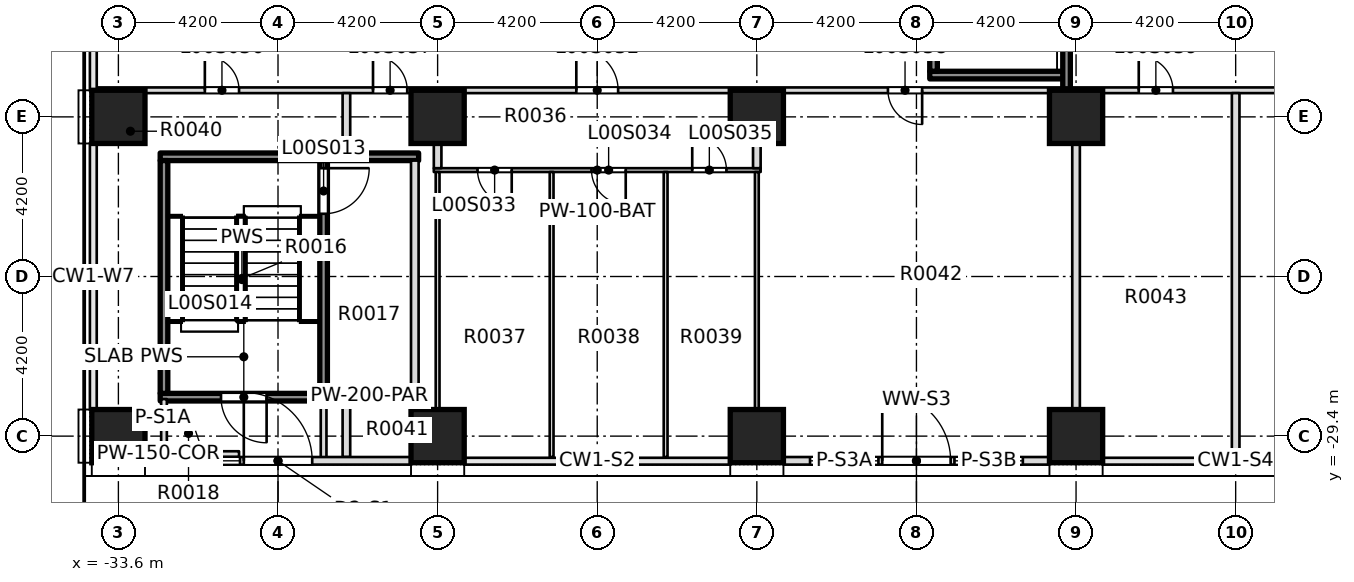
"""IFC4 building model, lengths in metres.
Left out: names, types, materials, properties, quantities, classifications, styles, units other than length and angle.
Written with IfcOpenShell. Run it as: python <this file> out.ifc"""

import sys

from ifc_helpers import new_model, si_unit, direction, frame, frame_2d, origin, origin_2d, place, context, subcontext, project, spatial, rectangle, extrude, element, fill, save


model = new_model("IFC4")
c1 = context("Model", 3, precision=1e-05, world=origin(), true_north=direction((0.0, 1.0)))
c2 = subcontext(c1, "Body", "Model", "MODEL_VIEW")
j1 = project(units=[si_unit("LENGTHUNIT", "METRE"), si_unit("PLANEANGLEUNIT", "RADIAN")], contexts=[c1])
p1 = place(None, origin())
s1 = spatial("IfcSite", under=j1, at=p1, CompositionType="ELEMENT")
p2 = place(p1, origin())
s2 = spatial("IfcBuilding", under=s1, at=p2, CompositionType="ELEMENT")
p3 = place(p2, origin())
s3 = spatial("IfcBuildingStorey", under=s2, at=p3, CompositionType="ELEMENT", Elevation=0.0)
for number, where, z_axis, x_axis in (
    (1, (-16.8, -21.0, -0.45), (0.0, 0.0, 1.0), (1.0, 0.0, 0.0)),
    (2, (-8.4, -21.0, -0.45), (0.0, 0.0, 1.0), (1.0, 0.0, 0.0)),
):
    element("IfcColumn", number, at=place(p3, frame(where, z_axis=z_axis, x_axis=x_axis)), inside=s3, PredefinedType="COLUMN", context=c2, shape_type="SweptSolid", body=[
        extrude(rectangle(XDim=1.4, YDim=1.4, at=origin_2d()), origin(), (0.0, 0.0, 1.0), 7.55),
    ])
for number, where, z_axis, x_axis in (
    (3, (-33.6, -29.4, 0.0), (0.0, 0.0, 1.0), (1.0, 0.0, 0.0)),
    (4, (-25.2, -29.4, 0.0), (0.0, 0.0, 1.0), (1.0, 0.0, 0.0)),
    (5, (-16.8, -29.4, 0.0), (0.0, 0.0, 1.0), (1.0, 0.0, 0.0)),
    (6, (-8.4, -29.4, 0.0), (0.0, 0.0, 1.0), (1.0, 0.0, 0.0)),
    (7, (-33.6, -21.0, 0.0), (0.0, 0.0, 1.0), (1.0, 0.0, 0.0)),
    (8, (-25.2, -21.0, 0.0), (0.0, 0.0, 1.0), (1.0, 0.0, 0.0)),
):
    element("IfcColumn", number, at=place(p3, frame(where, z_axis=z_axis, x_axis=x_axis)), inside=s3, PredefinedType="COLUMN", context=c2, shape_type="SweptSolid", body=[
        extrude(rectangle(XDim=1.4, YDim=1.4, at=origin_2d()), origin(), (0.0, 0.0, 1.0), 7.5),
    ])
p4 = place(p3, frame((-32.475, -29.873, 0.0), z_axis=(0.0, 0.0, 1.0), x_axis=(1.0, 0.0, 0.0)))
e9 = element("IfcWall", 9, at=p4, inside=s3, PredefinedType="PARTITIONING", context=c2, shape_type="SweptSolid", body=[
    extrude(rectangle(XDim=2.05, YDim=0.15, at=frame_2d((1.025, 0.0))), origin(), (0.0, 0.0, 1.0), 7.1),
])
p5 = place(p3, frame((-32.5, -28.375, 0.0), z_axis=(0.0, 0.0, 1.0), x_axis=(1.0, 0.0, 0.0)))
e10 = element("IfcWall", 10, at=p5, inside=s3, PredefinedType="SOLIDWALL", context=c2, shape_type="SweptSolid", body=[
    extrude(rectangle(XDim=4.4, YDim=0.2, at=frame_2d((2.2, 0.0))), origin(), (0.0, 0.0, 1.0), 7.1),
])
p6 = place(p5, frame((1.6, 0.0, 0.0)))
e11 = element("IfcOpeningElement", 11, at=p6, cuts=e10, PredefinedType="OPENING", context=c2, shape_type="SweptSolid", body=[
    extrude(rectangle(XDim=1.2, YDim=2.1, at=frame_2d((0.6, 1.05))), frame((0.0, 0.11, 0.0), z_axis=(0.0, -1.0, 0.0), x_axis=(1.0, 0.0, 0.0)), (0.0, 0.0, 1.0), 0.22),
])
p7 = place(p3, frame((-28.3, -28.35, 0.0), z_axis=(0.0, 0.0, 1.0), x_axis=(1.0, 0.0, 0.0)))
e12 = element("IfcWall", 12, at=p7, inside=s3, PredefinedType="PARTITIONING", context=c2, shape_type="SweptSolid", body=[
    extrude(rectangle(XDim=2.6, YDim=0.2, at=frame_2d((1.3, 0.0))), origin(), (0.0, 0.0, 1.0), 7.1),
])
p8 = place(p3, frame((-25.3, -22.4, 0.0), z_axis=(0.0, 0.0, 1.0), x_axis=(1.0, 0.0, 0.0)))
e13 = element("IfcWall", 13, at=p8, inside=s3, PredefinedType="PARTITIONING", context=c2, shape_type="SweptSolid", body=[
    extrude(rectangle(XDim=8.6, YDim=0.1, at=frame_2d((4.3, 0.0))), origin(), (0.0, 0.0, 1.0), 7.1),
])
p9 = place(p8, frame((1.15, 0.0, 0.0)))
e14 = element("IfcOpeningElement", 14, at=p9, cuts=e13, PredefinedType="OPENING", context=c2, shape_type="SweptSolid", body=[
    extrude(rectangle(XDim=0.9, YDim=2.1, at=frame_2d((0.45, 1.05))), frame((0.0, 0.06, 0.0), z_axis=(0.0, -1.0, 0.0), x_axis=(1.0, 0.0, 0.0)), (0.0, 0.0, 1.0), 0.12),
])
p10 = place(p8, frame((4.15, 0.0, 0.0)))
e15 = element("IfcOpeningElement", 15, at=p10, cuts=e13, PredefinedType="OPENING", context=c2, shape_type="SweptSolid", body=[
    extrude(rectangle(XDim=0.9, YDim=2.1, at=frame_2d((0.45, 1.05))), frame((0.0, 0.06, 0.0), z_axis=(0.0, -1.0, 0.0), x_axis=(1.0, 0.0, 0.0)), (0.0, 0.0, 1.0), 0.12),
])
p11 = place(p8, frame((6.8, 0.0, 0.0)))
e16 = element("IfcOpeningElement", 16, at=p11, cuts=e13, PredefinedType="OPENING", context=c2, shape_type="SweptSolid", body=[
    extrude(rectangle(XDim=0.9, YDim=2.1, at=frame_2d((0.45, 1.05))), frame((0.0, 0.06, 0.0), z_axis=(0.0, -1.0, 0.0), x_axis=(1.0, 0.0, 0.0)), (0.0, 0.0, 1.0), 0.12),
])
p12 = place(p3, frame((-32.5, -22.05, 0.0), z_axis=(0.0, 0.0, 1.0), x_axis=(1.0, 0.0, 0.0)))
e17 = element("IfcWall", 17, at=p12, inside=s3, PredefinedType="SOLIDWALL", context=c2, shape_type="SweptSolid", body=[
    extrude(rectangle(XDim=6.8, YDim=0.2, at=frame_2d((3.4, 0.0))), origin(), (0.0, 0.0, 1.0), 7.1),
])
p13 = place(p3, frame((-34.15, -20.3, 0.0), z_axis=(0.0, 0.0, 1.0), x_axis=(1.0, 0.0, 0.0)))
e18 = element("IfcWall", 18, at=p13, inside=s3, PredefinedType="PARTITIONING", context=c2, shape_type="SweptSolid", body=[
    extrude(rectangle(XDim=67.825, YDim=0.15, at=frame_2d((33.913, 0.0))), origin(), (0.0, 0.0, 1.0), 7.1),
])
p14 = place(p13, frame((12.6, 0.0, 0.0)))
e19 = element("IfcOpeningElement", 19, at=p14, cuts=e18, PredefinedType="OPENING", context=c2, shape_type="SweptSolid", body=[
    extrude(rectangle(XDim=1.1, YDim=2.1, at=frame_2d((0.55, 1.05))), frame((0.0, 0.085, 0.0), z_axis=(0.0, -1.0, 0.0), x_axis=(1.0, 0.0, 0.0)), (0.0, 0.0, 1.0), 0.17),
])
p15 = place(p13, frame((2.825, 0.0, 0.0)))
e20 = element("IfcOpeningElement", 20, at=p15, cuts=e18, PredefinedType="OPENING", context=c2, shape_type="SweptSolid", body=[
    extrude(rectangle(XDim=0.9, YDim=2.1, at=frame_2d((0.45, 1.05))), frame((0.0, 0.085, 0.0), z_axis=(0.0, -1.0, 0.0), x_axis=(1.0, 0.0, 0.0)), (0.0, 0.0, 1.0), 0.17),
])
p16 = place(p13, frame((7.25, 0.0, 0.0)))
e21 = element("IfcOpeningElement", 21, at=p16, cuts=e18, PredefinedType="OPENING", context=c2, shape_type="SweptSolid", body=[
    extrude(rectangle(XDim=0.9, YDim=2.1, at=frame_2d((0.45, 1.05))), frame((0.0, 0.085, 0.0), z_axis=(0.0, -1.0, 0.0), x_axis=(1.0, 0.0, 0.0)), (0.0, 0.0, 1.0), 0.17),
])
p17 = place(p13, frame((20.8, 0.0, 0.0)))
e22 = element("IfcOpeningElement", 22, at=p17, cuts=e18, PredefinedType="OPENING", context=c2, shape_type="SweptSolid", body=[
    extrude(rectangle(XDim=0.9, YDim=2.1, at=frame_2d((0.45, 1.05))), frame((0.0, 0.085, 0.0), z_axis=(0.0, -1.0, 0.0), x_axis=(1.0, 0.0, 0.0)), (0.0, 0.0, 1.0), 0.17),
])
p18 = place(p13, frame((27.4, 0.0, 0.0)))
e23 = element("IfcOpeningElement", 23, at=p18, cuts=e18, PredefinedType="OPENING", context=c2, shape_type="SweptSolid", body=[
    extrude(rectangle(XDim=0.9, YDim=2.1, at=frame_2d((0.45, 1.05))), frame((0.0, 0.085, 0.0), z_axis=(0.0, -1.0, 0.0), x_axis=(1.0, 0.0, 0.0)), (0.0, 0.0, 1.0), 0.17),
])
p19 = place(p13, frame((36.25, 0.0, 0.0)))
e24 = element("IfcOpeningElement", 24, at=p19, cuts=e18, PredefinedType="OPENING", context=c2, shape_type="SweptSolid", body=[
    extrude(rectangle(XDim=0.9, YDim=2.1, at=frame_2d((0.45, 1.05))), frame((0.0, 0.085, 0.0), z_axis=(0.0, -1.0, 0.0), x_axis=(1.0, 0.0, 0.0)), (0.0, 0.0, 1.0), 0.17),
])
p20 = place(p13, frame((46.65, 0.0, 0.0)))
e25 = element("IfcOpeningElement", 25, at=p20, cuts=e18, PredefinedType="OPENING", context=c2, shape_type="SweptSolid", body=[
    extrude(rectangle(XDim=0.9, YDim=2.1, at=frame_2d((0.45, 1.05))), frame((0.0, 0.085, 0.0), z_axis=(0.0, -1.0, 0.0), x_axis=(1.0, 0.0, 0.0)), (0.0, 0.0, 1.0), 0.17),
])
p21 = place(p13, frame((54.6, 0.0, 0.0)))
e26 = element("IfcOpeningElement", 26, at=p21, cuts=e18, PredefinedType="OPENING", context=c2, shape_type="SweptSolid", body=[
    extrude(rectangle(XDim=1.1, YDim=2.1, at=frame_2d((0.55, 1.05))), frame((0.0, 0.085, 0.0), z_axis=(0.0, -1.0, 0.0), x_axis=(1.0, 0.0, 0.0)), (0.0, 0.0, 1.0), 0.17),
])
p22 = place(p13, frame((63.1, 0.0, 0.0)))
e27 = element("IfcOpeningElement", 27, at=p22, cuts=e18, PredefinedType="OPENING", context=c2, shape_type="SweptSolid", body=[
    extrude(rectangle(XDim=0.9, YDim=2.1, at=frame_2d((0.45, 1.05))), frame((0.0, 0.085, 0.0), z_axis=(0.0, -1.0, 0.0), x_axis=(1.0, 0.0, 0.0)), (0.0, 0.0, 1.0), 0.17),
])
p23 = place(p3, frame((-32.4, -29.975, 0.0), z_axis=(0.0, 0.0, 1.0), x_axis=(0.0, 1.0, 0.0)))
e28 = element("IfcWall", 28, at=p23, inside=s3, PredefinedType="PARTITIONING", context=c2, shape_type="SweptSolid", body=[
    extrude(rectangle(XDim=1.55, YDim=0.15, at=frame_2d((0.775, 0.0))), origin(), (0.0, 0.0, 1.0), 7.1),
])
p24 = place(p3, frame((-32.4, -28.275, 0.0), z_axis=(0.0, 0.0, 1.0), x_axis=(0.0, 1.0, 0.0)))
e29 = element("IfcWall", 29, at=p24, inside=s3, PredefinedType="SOLIDWALL", context=c2, shape_type="SweptSolid", body=[
    extrude(rectangle(XDim=6.125, YDim=0.2, at=frame_2d((3.062, 0.0))), origin(), (0.0, 0.0, 1.0), 7.1),
])
p25 = place(p3, frame((-28.2, -29.975, 0.0), z_axis=(0.0, 0.0, 1.0), x_axis=(0.0, 1.0, 0.0)))
e30 = element("IfcWall", 30, at=p25, inside=s3, PredefinedType="PARTITIONING", context=c2, shape_type="SweptSolid", body=[
    extrude(rectangle(XDim=1.525, YDim=0.15, at=frame_2d((0.763, 0.0))), origin(), (0.0, 0.0, 1.0), 7.1),
])
p26 = place(p3, frame((-28.2, -28.25, 0.0), z_axis=(0.0, 0.0, 1.0), x_axis=(0.0, 1.0, 0.0)))
e31 = element("IfcWall", 31, at=p26, inside=s3, PredefinedType="SOLIDWALL", context=c2, shape_type="SweptSolid", body=[
    extrude(rectangle(XDim=6.1, YDim=0.2, at=frame_2d((3.05, 0.0))), origin(), (0.0, 0.0, 1.0), 7.1),
])
p27 = place(p26, frame((4.7, 0.0, 0.0)))
e32 = element("IfcOpeningElement", 32, at=p27, cuts=e31, PredefinedType="OPENING", context=c2, shape_type="SweptSolid", body=[
    extrude(rectangle(XDim=1.2, YDim=2.1, at=frame_2d((0.6, 1.05))), frame((0.0, 0.11, 0.0), z_axis=(0.0, -1.0, 0.0), x_axis=(1.0, 0.0, 0.0)), (0.0, 0.0, 1.0), 0.22),
])
p28 = place(p3, frame((-27.6, -29.95, 0.0), z_axis=(0.0, 0.0, 1.0), x_axis=(0.0, 1.0, 0.0)))
e33 = element("IfcWall", 33, at=p28, inside=s3, PredefinedType="PARTITIONING", context=c2, shape_type="SweptSolid", body=[
    extrude(rectangle(XDim=1.5, YDim=0.2, at=frame_2d((0.75, 0.0))), origin(), (0.0, 0.0, 1.0), 7.1),
])
p29 = place(p3, frame((-27.6, -21.95, 0.0), z_axis=(0.0, 0.0, 1.0), x_axis=(0.0, 1.0, 0.0)))
e34 = element("IfcWall", 34, at=p29, inside=s3, PredefinedType="PARTITIONING", context=c2, shape_type="SweptSolid", body=[
    extrude(rectangle(XDim=1.575, YDim=0.2, at=frame_2d((0.788, 0.0))), origin(), (0.0, 0.0, 1.0), 7.1),
])
p30 = place(p3, frame((-25.8, -28.25, 0.0), z_axis=(0.0, 0.0, 1.0), x_axis=(0.0, 1.0, 0.0)))
e35 = element("IfcWall", 35, at=p30, inside=s3, PredefinedType="PARTITIONING", context=c2, shape_type="SweptSolid", body=[
    extrude(rectangle(XDim=6.1, YDim=0.2, at=frame_2d((3.05, 0.0))), origin(), (0.0, 0.0, 1.0), 7.1),
])
p31 = place(p3, frame((-25.2, -29.95, 0.0), z_axis=(0.0, 0.0, 1.0), x_axis=(0.0, 1.0, 0.0)))
e36 = element("IfcWall", 36, at=p31, inside=s3, PredefinedType="PARTITIONING", context=c2, shape_type="SweptSolid", body=[
    extrude(rectangle(XDim=7.5, YDim=0.1, at=frame_2d((3.75, 0.0))), origin(), (0.0, 0.0, 1.0), 7.1),
])
p32 = place(p3, frame((-25.2, -22.35, 0.0), z_axis=(0.0, 0.0, 1.0), x_axis=(0.0, 1.0, 0.0)))
e37 = element("IfcWall", 37, at=p32, inside=s3, PredefinedType="PARTITIONING", context=c2, shape_type="SweptSolid", body=[
    extrude(rectangle(XDim=1.975, YDim=0.2, at=frame_2d((0.988, 0.0))), origin(), (0.0, 0.0, 1.0), 7.1),
])
for number, where, z_axis, x_axis in (
    (38, (-22.2, -29.95, 0.0), (0.0, 0.0, 1.0), (0.0, 1.0, 0.0)),
    (39, (-19.2, -29.95, 0.0), (0.0, 0.0, 1.0), (0.0, 1.0, 0.0)),
    (40, (-16.8, -29.95, 0.0), (0.0, 0.0, 1.0), (0.0, 1.0, 0.0)),
):
    element("IfcWall", number, at=place(p3, frame(where, z_axis=z_axis, x_axis=x_axis)), inside=s3, PredefinedType="PARTITIONING", context=c2, shape_type="SweptSolid", body=[
        extrude(rectangle(XDim=7.5, YDim=0.1, at=frame_2d((3.75, 0.0))), origin(), (0.0, 0.0, 1.0), 7.1),
    ])
p33 = place(p3, frame((-16.8, -22.35, 0.0), z_axis=(0.0, 0.0, 1.0), x_axis=(0.0, 1.0, 0.0)))
e41 = element("IfcWall", 41, at=p33, inside=s3, PredefinedType="PARTITIONING", context=c2, shape_type="SweptSolid", body=[
    extrude(rectangle(XDim=1.975, YDim=0.2, at=frame_2d((0.988, 0.0))), origin(), (0.0, 0.0, 1.0), 7.1),
])
for number, where, z_axis, x_axis in (
    (42, (-8.4, -29.95, 0.0), (0.0, 0.0, 1.0), (0.0, 1.0, 0.0)),
    (43, (-4.2, -29.95, 0.0), (0.0, 0.0, 1.0), (0.0, 1.0, 0.0)),
):
    element("IfcWall", number, at=place(p3, frame(where, z_axis=z_axis, x_axis=x_axis)), inside=s3, PredefinedType="PARTITIONING", context=c2, shape_type="SweptSolid", body=[
        extrude(rectangle(XDim=9.575, YDim=0.2, at=frame_2d((4.788, 0.0))), origin(), (0.0, 0.0, 1.0), 7.1),
    ])
p34 = place(p3, frame((-25.9, -30.05, 0.0), z_axis=(0.0, 0.0, 1.0), x_axis=(-1.0, 0.0, 0.0)))
e44 = element("IfcWall", 44, at=p34, inside=s3, PredefinedType="STANDARD", context=c2, shape_type="SweptSolid", body=[
    extrude(rectangle(XDim=7.0, YDim=0.2, at=frame_2d((3.5, 0.0))), origin(), (0.0, 0.0, 1.0), 7.1),
])
p35 = place(p34, frame((4.5, 0.0, 0.3)))
e45 = element("IfcOpeningElement", 45, at=p35, cuts=e44, PredefinedType="OPENING", context=c2, shape_type="SweptSolid", body=[
    extrude(rectangle(XDim=1.8, YDim=4.2, at=frame_2d((0.9, 2.1))), frame((0.0, 0.11, 0.0), z_axis=(0.0, -1.0, 0.0), x_axis=(1.0, 0.0, 0.0)), (0.0, 0.0, 1.0), 0.22),
])
p36 = place(p34, frame((2.6, 0.0, 0.0)))
e46 = element("IfcOpeningElement", 46, at=p36, cuts=e44, PredefinedType="OPENING", context=c2, shape_type="SweptSolid", body=[
    extrude(rectangle(XDim=1.8, YDim=2.4, at=frame_2d((0.9, 1.2))), frame((0.0, 0.11, 0.0), z_axis=(0.0, -1.0, 0.0), x_axis=(1.0, 0.0, 0.0)), (0.0, 0.0, 1.0), 0.22),
])
p37 = place(p3, frame((-9.1, -30.05, 0.0), z_axis=(0.0, 0.0, 1.0), x_axis=(-1.0, 0.0, 0.0)))
e47 = element("IfcWall", 47, at=p37, inside=s3, PredefinedType="STANDARD", context=c2, shape_type="SweptSolid", body=[
    extrude(rectangle(XDim=7.0, YDim=0.2, at=frame_2d((3.5, 0.0))), origin(), (0.0, 0.0, 1.0), 7.1),
])
p38 = place(p37, frame((4.5, 0.0, 0.3)))
e48 = element("IfcOpeningElement", 48, at=p38, cuts=e47, PredefinedType="OPENING", context=c2, shape_type="SweptSolid", body=[
    extrude(rectangle(XDim=1.8, YDim=4.2, at=frame_2d((0.9, 2.1))), frame((0.0, 0.11, 0.0), z_axis=(0.0, -1.0, 0.0), x_axis=(1.0, 0.0, 0.0)), (0.0, 0.0, 1.0), 0.22),
])
p39 = place(p37, frame((2.6, 0.0, 0.0)))
e49 = element("IfcOpeningElement", 49, at=p39, cuts=e47, PredefinedType="OPENING", context=c2, shape_type="SweptSolid", body=[
    extrude(rectangle(XDim=1.8, YDim=2.4, at=frame_2d((0.9, 1.2))), frame((0.0, 0.11, 0.0), z_axis=(0.0, -1.0, 0.0), x_axis=(1.0, 0.0, 0.0)), (0.0, 0.0, 1.0), 0.22),
])
p40 = place(p37, frame((0.7, 0.0, 0.3)))
e50 = element("IfcOpeningElement", 50, at=p40, cuts=e47, PredefinedType="OPENING", context=c2, shape_type="SweptSolid", body=[
    extrude(rectangle(XDim=1.8, YDim=4.2, at=frame_2d((0.9, 2.1))), frame((0.0, 0.11, 0.0), z_axis=(0.0, -1.0, 0.0), x_axis=(1.0, 0.0, 0.0)), (0.0, 0.0, 1.0), 0.22),
])
p41 = place(p3, frame((-12.25, -19.9, 0.0), z_axis=(0.0, 0.0, 1.0), x_axis=(1.0, 0.0, 0.0)))
e51 = element("IfcWall", 51, at=p41, inside=s3, PredefinedType="SOLIDWALL", context=c2, shape_type="SweptSolid", body=[
    extrude(rectangle(XDim=3.7, YDim=0.2, at=frame_2d((1.85, 0.0))), origin(), (0.0, 0.0, 1.0), 7.1),
])
p42 = place(p3, frame((-12.15, -19.8, 0.0), z_axis=(0.0, 0.0, 1.0), x_axis=(0.0, 1.0, 0.0)))
e52 = element("IfcWall", 52, at=p42, inside=s3, PredefinedType="SOLIDWALL", context=c2, shape_type="SweptSolid", body=[
    extrude(rectangle(XDim=6.6, YDim=0.2, at=frame_2d((3.3, 0.0))), origin(), (0.0, 0.0, 1.0), 7.1),
])
p43 = place(p3, frame((-8.65, -20.3, 0.0), z_axis=(0.0, 0.0, 1.0), x_axis=(0.0, 1.0, 0.0)))
e53 = element("IfcWall", 53, at=p43, inside=s3, PredefinedType="SOLIDWALL", context=c2, shape_type="SweptSolid", body=[
    extrude(rectangle(XDim=7.1, YDim=0.2, at=frame_2d((3.55, 0.0))), origin(), (0.0, 0.0, 1.0), 7.1),
])
p44 = place(p27, origin())
e54 = element("IfcDoor", 54, at=p44, inside=s3, OperationType="DOUBLE_DOOR_SINGLE_SWING", PredefinedType="DOOR", context=c2, shape_type="SweptSolid", body=[
    extrude(rectangle(XDim=1.2, YDim=2.1, at=frame_2d((0.6, 1.05))), frame((0.0, 0.025, 0.0), z_axis=(0.0, -1.0, 0.0), x_axis=(1.0, 0.0, 0.0)), (0.0, 0.0, 1.0), 0.05),
])
fill(e32, e54)
p45 = place(p6, origin())
e55 = element("IfcDoor", 55, at=p45, inside=s3, OperationType="DOUBLE_DOOR_SINGLE_SWING", PredefinedType="DOOR", context=c2, shape_type="SweptSolid", body=[
    extrude(rectangle(XDim=1.2, YDim=2.1, at=frame_2d((0.6, 1.05))), frame((0.0, 0.025, 0.0), z_axis=(0.0, -1.0, 0.0), x_axis=(1.0, 0.0, 0.0)), (0.0, 0.0, 1.0), 0.05),
])
fill(e11, e55)
p46 = place(p14, origin())
e56 = element("IfcDoor", 56, at=p46, inside=s3, OperationType="SINGLE_SWING_LEFT", PredefinedType="DOOR", context=c2, shape_type="SweptSolid", body=[
    extrude(rectangle(XDim=1.1, YDim=2.1, at=frame_2d((0.55, 1.05))), frame((0.0, 0.025, 0.0), z_axis=(0.0, -1.0, 0.0), x_axis=(1.0, 0.0, 0.0)), (0.0, 0.0, 1.0), 0.05),
])
fill(e19, e56)
p47 = place(p9, origin())
e57 = element("IfcDoor", 57, at=p47, inside=s3, OperationType="SINGLE_SWING_RIGHT", PredefinedType="DOOR", context=c2, shape_type="SweptSolid", body=[
    extrude(rectangle(XDim=0.9, YDim=2.1, at=frame_2d((0.45, 1.05))), frame((0.0, 0.025, 0.0), z_axis=(0.0, -1.0, 0.0), x_axis=(1.0, 0.0, 0.0)), (0.0, 0.0, 1.0), 0.05),
])
fill(e14, e57)
p48 = place(p10, origin())
e58 = element("IfcDoor", 58, at=p48, inside=s3, OperationType="SINGLE_SWING_RIGHT", PredefinedType="DOOR", context=c2, shape_type="SweptSolid", body=[
    extrude(rectangle(XDim=0.9, YDim=2.1, at=frame_2d((0.45, 1.05))), frame((0.0, 0.025, 0.0), z_axis=(0.0, -1.0, 0.0), x_axis=(1.0, 0.0, 0.0)), (0.0, 0.0, 1.0), 0.05),
])
fill(e15, e58)
p49 = place(p11, origin())
e59 = element("IfcDoor", 59, at=p49, inside=s3, OperationType="SINGLE_SWING_RIGHT", PredefinedType="DOOR", context=c2, shape_type="SweptSolid", body=[
    extrude(rectangle(XDim=0.9, YDim=2.1, at=frame_2d((0.45, 1.05))), frame((0.0, 0.025, 0.0), z_axis=(0.0, -1.0, 0.0), x_axis=(1.0, 0.0, 0.0)), (0.0, 0.0, 1.0), 0.05),
])
fill(e16, e59)
p50 = place(p15, origin())
e60 = element("IfcDoor", 60, at=p50, inside=s3, OperationType="SINGLE_SWING_LEFT", PredefinedType="DOOR", context=c2, shape_type="SweptSolid", body=[
    extrude(rectangle(XDim=0.9, YDim=2.1, at=frame_2d((0.45, 1.05))), frame((0.0, 0.025, 0.0), z_axis=(0.0, -1.0, 0.0), x_axis=(1.0, 0.0, 0.0)), (0.0, 0.0, 1.0), 0.05),
])
fill(e20, e60)
p51 = place(p16, origin())
e61 = element("IfcDoor", 61, at=p51, inside=s3, OperationType="SINGLE_SWING_RIGHT", PredefinedType="DOOR", context=c2, shape_type="SweptSolid", body=[
    extrude(rectangle(XDim=0.9, YDim=2.1, at=frame_2d((0.45, 1.05))), frame((0.0, 0.025, 0.0), z_axis=(0.0, -1.0, 0.0), x_axis=(1.0, 0.0, 0.0)), (0.0, 0.0, 1.0), 0.05),
])
fill(e21, e61)
p52 = place(p17, origin())
e62 = element("IfcDoor", 62, at=p52, inside=s3, OperationType="SINGLE_SWING_LEFT", PredefinedType="DOOR", context=c2, shape_type="SweptSolid", body=[
    extrude(rectangle(XDim=0.9, YDim=2.1, at=frame_2d((0.45, 1.05))), frame((0.0, 0.025, 0.0), z_axis=(0.0, -1.0, 0.0), x_axis=(1.0, 0.0, 0.0)), (0.0, 0.0, 1.0), 0.05),
])
fill(e22, e62)
p53 = place(p18, origin())
e63 = element("IfcDoor", 63, at=p53, inside=s3, OperationType="SINGLE_SWING_RIGHT", PredefinedType="DOOR", context=c2, shape_type="SweptSolid", body=[
    extrude(rectangle(XDim=0.9, YDim=2.1, at=frame_2d((0.45, 1.05))), frame((0.0, 0.025, 0.0), z_axis=(0.0, -1.0, 0.0), x_axis=(1.0, 0.0, 0.0)), (0.0, 0.0, 1.0), 0.05),
])
fill(e23, e63)
p54 = place(p35, origin())
e64 = element("IfcWindow", 64, at=p54, inside=s3, PartitioningType="SINGLE_PANEL", PredefinedType="WINDOW", context=c2, shape_type="SweptSolid", body=[
    extrude(rectangle(XDim=1.8, YDim=4.2, at=frame_2d((0.9, 2.1))), frame((0.0, 0.03, 0.0), z_axis=(0.0, -1.0, 0.0), x_axis=(1.0, 0.0, 0.0)), (0.0, 0.0, 1.0), 0.06),
])
fill(e45, e64)
p55 = place(p36, origin())
e65 = element("IfcDoor", 65, at=p55, inside=s3, OperationType="SINGLE_SWING_LEFT", PredefinedType="DOOR", context=c2, shape_type="SweptSolid", body=[
    extrude(rectangle(XDim=1.8, YDim=2.4, at=frame_2d((0.9, 1.2))), frame((0.0, 0.025, 0.0), z_axis=(0.0, -1.0, 0.0), x_axis=(1.0, 0.0, 0.0)), (0.0, 0.0, 1.0), 0.05),
])
fill(e46, e65)
p56 = place(p38, origin())
e66 = element("IfcWindow", 66, at=p56, inside=s3, PartitioningType="SINGLE_PANEL", PredefinedType="WINDOW", context=c2, shape_type="SweptSolid", body=[
    extrude(rectangle(XDim=1.8, YDim=4.2, at=frame_2d((0.9, 2.1))), frame((0.0, 0.03, 0.0), z_axis=(0.0, -1.0, 0.0), x_axis=(1.0, 0.0, 0.0)), (0.0, 0.0, 1.0), 0.06),
])
fill(e48, e66)
p57 = place(p39, origin())
e67 = element("IfcDoor", 67, at=p57, inside=s3, OperationType="SINGLE_SWING_LEFT", PredefinedType="DOOR", context=c2, shape_type="SweptSolid", body=[
    extrude(rectangle(XDim=1.8, YDim=2.4, at=frame_2d((0.9, 1.2))), frame((0.0, 0.025, 0.0), z_axis=(0.0, -1.0, 0.0), x_axis=(1.0, 0.0, 0.0)), (0.0, 0.0, 1.0), 0.05),
])
fill(e49, e67)
p58 = place(p40, origin())
e68 = element("IfcWindow", 68, at=p58, inside=s3, PartitioningType="SINGLE_PANEL", PredefinedType="WINDOW", context=c2, shape_type="SweptSolid", body=[
    extrude(rectangle(XDim=1.8, YDim=4.2, at=frame_2d((0.9, 2.1))), frame((0.0, 0.03, 0.0), z_axis=(0.0, -1.0, 0.0), x_axis=(1.0, 0.0, 0.0)), (0.0, 0.0, 1.0), 0.06),
])
fill(e50, e68)
save(model, sys.argv[1])
